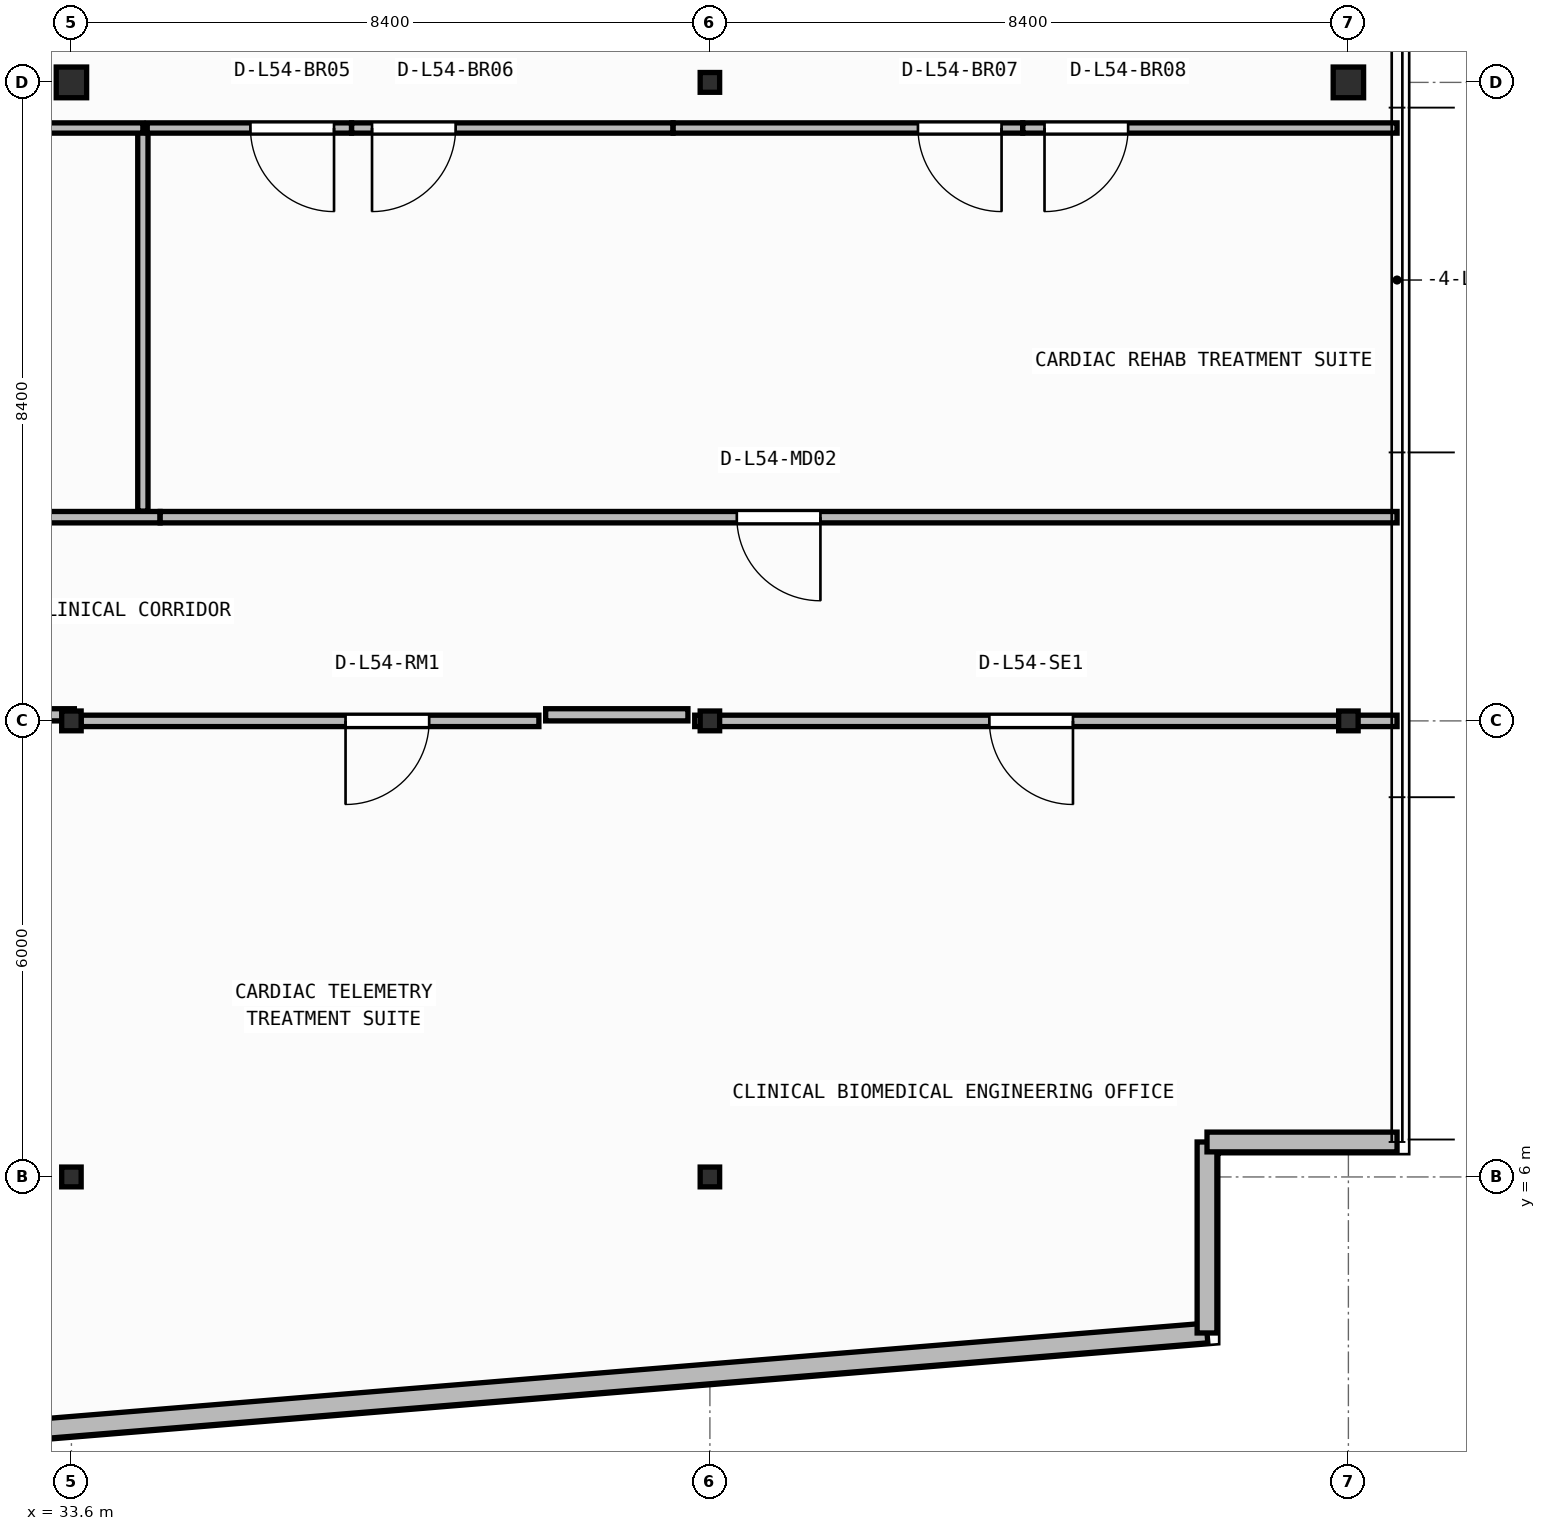
"""IFC4 building model, lengths in metres.
Left out: names, types, materials, properties, quantities, classifications, styles, units other than length and angle.
Written with IfcOpenShell. Run it as: python <this file> out.ifc"""

import sys

from ifc_helpers import new_model, si_unit, direction, frame, frame_2d, origin, origin_2d, place, context, subcontext, project, spatial, rectangle, i_section, extrude, element, fill, save


model = new_model("IFC4")
c1 = context("Model", 3, precision=1e-05, world=origin(), true_north=direction((0.0, 1.0)))
c2 = subcontext(c1, "Body", "Model", "MODEL_VIEW")
j1 = project(units=[si_unit("LENGTHUNIT", "METRE"), si_unit("PLANEANGLEUNIT", "RADIAN")], contexts=[c1])
p1 = place(None, origin())
s1 = spatial("IfcSite", under=j1, at=p1, CompositionType="ELEMENT")
p2 = place(p1, origin())
s2 = spatial("IfcBuilding", under=s1, at=p2, CompositionType="ELEMENT")
p3 = place(p2, frame((0.0, 0.0, 219.75)))
s3 = spatial("IfcBuildingStorey", under=s2, at=p3, CompositionType="ELEMENT", Elevation=219.75)
for number, where, z_axis, x_axis in (
    (1, (33.6, 6.0, 0.0), (0.0, 0.0, 1.0), (1.0, 0.0, 0.0)),
    (2, (42.0, 6.0, 0.0), (0.0, 0.0, 1.0), (1.0, 0.0, 0.0)),
    (3, (33.6, 12.0, 0.0), (0.0, 0.0, 1.0), (1.0, 0.0, 0.0)),
    (4, (42.0, 12.0, 0.0), (0.0, 0.0, 1.0), (1.0, 0.0, 0.0)),
    (5, (50.4, 12.0, 0.0), (0.0, 0.0, 1.0), (1.0, 0.0, 0.0)),
):
    element("IfcColumn", number, at=place(p3, frame(where, z_axis=z_axis, x_axis=x_axis)), inside=s3, PredefinedType="COLUMN", context=c2, shape_type="SweptSolid", body=[
        extrude(i_section(OverallWidth=0.256, OverallDepth=0.26, WebThickness=0.01, FlangeThickness=0.017, FilletRadius=0.013, at=origin_2d()), origin(), (0.0, 0.0, 1.0), 3.95),
    ])
p4 = place(p3, frame((33.6, 20.4, 0.0), z_axis=(0.0, 0.0, 1.0), x_axis=(1.0, 0.0, 0.0)))
e6 = element("IfcColumn", 6, at=p4, inside=s3, PredefinedType="COLUMN", context=c2, shape_type="SweptSolid", body=[
    extrude(i_section(OverallWidth=0.4, OverallDepth=0.404, WebThickness=0.02, FlangeThickness=0.032, at=origin_2d()), origin(), (0.0, 0.0, 1.0), 3.95),
])
p5 = place(p3, frame((42.0, 20.4, 0.0), z_axis=(0.0, 0.0, 1.0), x_axis=(1.0, 0.0, 0.0)))
e7 = element("IfcColumn", 7, at=p5, inside=s3, PredefinedType="COLUMN", context=c2, shape_type="SweptSolid", body=[
    extrude(i_section(OverallWidth=0.256, OverallDepth=0.26, WebThickness=0.01, FlangeThickness=0.017, FilletRadius=0.013, at=origin_2d()), origin(), (0.0, 0.0, 1.0), 3.95),
])
p6 = place(p3, frame((50.4, 20.4, 0.0), z_axis=(0.0, 0.0, 1.0), x_axis=(1.0, 0.0, 0.0)))
e8 = element("IfcColumn", 8, at=p6, inside=s3, PredefinedType="COLUMN", context=c2, shape_type="SweptSolid", body=[
    extrude(i_section(OverallWidth=0.4, OverallDepth=0.404, WebThickness=0.02, FlangeThickness=0.032, at=origin_2d()), origin(), (0.0, 0.0, 1.0), 3.95),
])
p7 = place(p3, frame((2.66, 0.174, 0.0), z_axis=(0.0, 0.0, 1.0), x_axis=(0.996634028439, 0.081979347142, 0.0)))
e9 = element("IfcWall", 9, at=p7, inside=s3, PredefinedType="STANDARD", context=c2, shape_type="SweptSolid", body=[
    extrude(rectangle(XDim=46.035, YDim=0.26, at=frame_2d((23.018, 0.0))), origin(), (0.0, 0.0, 1.0), 3.71),
])
p8 = place(p7, frame((21.817, 0.0, 0.9)))
e10 = element("IfcOpeningElement", 10, at=p8, cuts=e9, PredefinedType="OPENING", context=c2, shape_type="SweptSolid", body=[
    extrude(rectangle(XDim=2.4, YDim=1.65, at=frame_2d((1.2, 0.825))), frame((0.0, 0.14, 0.0), z_axis=(0.0, -1.0, 0.0), x_axis=(1.0, 0.0, 0.0)), (0.0, 0.0, 1.0), 0.28),
])
p9 = place(p3, frame((48.54, 3.948, 0.0), z_axis=(0.0, 0.0, 1.0), x_axis=(0.0, 1.0, 0.0)))
e11 = element("IfcWall", 11, at=p9, inside=s3, PredefinedType="STANDARD", context=c2, shape_type="SweptSolid", body=[
    extrude(rectangle(XDim=2.512, YDim=0.26, at=frame_2d((1.256, 0.0))), origin(), (0.0, 0.0, 1.0), 3.71),
])
p10 = place(p3, frame((48.54, 6.46, 0.0), z_axis=(0.0, 0.0, 1.0), x_axis=(1.0, 0.0, 0.0)))
e12 = element("IfcWall", 12, at=p10, inside=s3, PredefinedType="STANDARD", context=c2, shape_type="SweptSolid", body=[
    extrude(rectangle(XDim=2.5, YDim=0.26, at=frame_2d((1.25, 0.0))), origin(), (0.0, 0.0, 1.0), 3.71),
])
p11 = place(p3, frame((39.75, 12.0, 0.0), z_axis=(0.0, 0.0, 1.0), x_axis=(-1.0, 0.0, 0.0)))
e13 = element("IfcWall", 13, at=p11, inside=s3, PredefinedType="PARTITIONING", context=c2, shape_type="SweptSolid", body=[
    extrude(rectangle(XDim=6.022, YDim=0.15, at=frame_2d((3.011, 0.0))), origin(), (0.0, 0.0, 1.0), 3.152),
])
p12 = place(p11, frame((1.444, 0.0, 0.0)))
e14 = element("IfcOpeningElement", 14, at=p12, cuts=e13, PredefinedType="OPENING", context=c2, shape_type="SweptSolid", body=[
    extrude(rectangle(XDim=1.1, YDim=2.1, at=frame_2d((0.55, 1.05))), frame((0.0, 0.085, 0.0), z_axis=(0.0, -1.0, 0.0), x_axis=(1.0, 0.0, 0.0)), (0.0, 0.0, 1.0), 0.17),
])
p13 = place(p3, frame((51.04, 12.0, 0.0), z_axis=(0.0, 0.0, 1.0), x_axis=(-1.0, 0.0, 0.0)))
e15 = element("IfcWall", 15, at=p13, inside=s3, PredefinedType="PARTITIONING", context=c2, shape_type="SweptSolid", body=[
    extrude(rectangle(XDim=9.24, YDim=0.15, at=frame_2d((4.62, 0.0))), origin(), (0.0, 0.0, 1.0), 3.152),
])
p14 = place(p13, frame((4.263, 0.0, 0.0)))
e16 = element("IfcOpeningElement", 16, at=p14, cuts=e15, PredefinedType="OPENING", context=c2, shape_type="SweptSolid", body=[
    extrude(rectangle(XDim=1.1, YDim=2.1, at=frame_2d((0.55, 1.05))), frame((0.0, 0.085, 0.0), z_axis=(0.0, -1.0, 0.0), x_axis=(1.0, 0.0, 0.0)), (0.0, 0.0, 1.0), 0.17),
])
p15 = place(p3, frame((34.766, 14.68, 0.0), z_axis=(0.0, 0.0, 1.0), x_axis=(-1.0, 0.0, 0.0)))
e17 = element("IfcWall", 17, at=p15, inside=s3, PredefinedType="PARTITIONING", context=c2, shape_type="SweptSolid", body=[
    extrude(rectangle(XDim=21.212, YDim=0.15, at=frame_2d((10.606, 0.0))), origin(), (0.0, 0.0, 1.0), 3.71),
])
p16 = place(p15, frame((10.056, 0.0, 0.0)))
e18 = element("IfcOpeningElement", 18, at=p16, cuts=e17, PredefinedType="OPENING", context=c2, shape_type="SweptSolid", body=[
    extrude(rectangle(XDim=1.1, YDim=2.1, at=frame_2d((0.55, 1.05))), frame((0.0, 0.085, 0.0), z_axis=(0.0, -1.0, 0.0), x_axis=(1.0, 0.0, 0.0)), (0.0, 0.0, 1.0), 0.17),
])
p17 = place(p3, frame((51.04, 14.68, 0.0), z_axis=(0.0, 0.0, 1.0), x_axis=(-1.0, 0.0, 0.0)))
e19 = element("IfcWall", 19, at=p17, inside=s3, PredefinedType="PARTITIONING", context=c2, shape_type="SweptSolid", body=[
    extrude(rectangle(XDim=16.272, YDim=0.15, at=frame_2d((8.136, 0.0))), origin(), (0.0, 0.0, 1.0), 3.71),
])
p18 = place(p17, frame((7.586, 0.0, 0.0)))
e20 = element("IfcOpeningElement", 20, at=p18, cuts=e19, PredefinedType="OPENING", context=c2, shape_type="SweptSolid", body=[
    extrude(rectangle(XDim=1.1, YDim=2.1, at=frame_2d((0.55, 1.05))), frame((0.0, 0.085, 0.0), z_axis=(0.0, -1.0, 0.0), x_axis=(1.0, 0.0, 0.0)), (0.0, 0.0, 1.0), 0.17),
])
p19 = place(p3, frame((34.54, 14.76, 0.0), z_axis=(0.0, 0.0, 1.0), x_axis=(0.0, 1.0, 0.0)))
e21 = element("IfcWall", 21, at=p19, inside=s3, PredefinedType="PARTITIONING", context=c2, shape_type="SweptSolid", body=[
    extrude(rectangle(XDim=5.04, YDim=0.135, at=frame_2d((2.52, 0.0))), origin(), (0.0, 0.0, 1.0), 3.71),
])
p20 = place(p3, frame((34.54, 19.8, 0.0), z_axis=(0.0, 0.0, 1.0), x_axis=(-1.0, 0.0, 0.0)))
e22 = element("IfcWall", 22, at=p20, inside=s3, PredefinedType="PARTITIONING", context=c2, shape_type="SweptSolid", body=[
    extrude(rectangle(XDim=2.223, YDim=0.135, at=frame_2d((1.112, 0.0))), origin(), (0.0, 0.0, 1.0), 3.71),
])
p21 = place(p3, frame((37.285, 19.8, 0.0), z_axis=(0.0, 0.0, 1.0), x_axis=(-1.0, 0.0, 0.0)))
e23 = element("IfcWall", 23, at=p21, inside=s3, PredefinedType="PARTITIONING", context=c2, shape_type="SweptSolid", body=[
    extrude(rectangle(XDim=2.687, YDim=0.135, at=frame_2d((1.344, 0.0))), origin(), (0.0, 0.0, 1.0), 3.71),
])
p22 = place(p21, frame((0.23, 0.0, 0.0)))
e24 = element("IfcOpeningElement", 24, at=p22, cuts=e23, PredefinedType="OPENING", context=c2, shape_type="SweptSolid", body=[
    extrude(rectangle(XDim=1.1, YDim=2.1, at=frame_2d((0.55, 1.05))), frame((0.0, 0.077, 0.0), z_axis=(0.0, -1.0, 0.0), x_axis=(1.0, 0.0, 0.0)), (0.0, 0.0, 1.0), 0.155),
])
p23 = place(p3, frame((41.515, 19.8, 0.0), z_axis=(0.0, 0.0, 1.0), x_axis=(-1.0, 0.0, 0.0)))
e25 = element("IfcWall", 25, at=p23, inside=s3, PredefinedType="PARTITIONING", context=c2, shape_type="SweptSolid", body=[
    extrude(rectangle(XDim=4.228, YDim=0.135, at=frame_2d((2.114, 0.0))), origin(), (0.0, 0.0, 1.0), 3.71),
])
p24 = place(p23, frame((2.86, 0.0, 0.0)))
e26 = element("IfcOpeningElement", 26, at=p24, cuts=e25, PredefinedType="OPENING", context=c2, shape_type="SweptSolid", body=[
    extrude(rectangle(XDim=1.1, YDim=2.1, at=frame_2d((0.55, 1.05))), frame((0.0, 0.077, 0.0), z_axis=(0.0, -1.0, 0.0), x_axis=(1.0, 0.0, 0.0)), (0.0, 0.0, 1.0), 0.155),
])
p25 = place(p3, frame((46.115, 19.8, 0.0), z_axis=(0.0, 0.0, 1.0), x_axis=(-1.0, 0.0, 0.0)))
e27 = element("IfcWall", 27, at=p25, inside=s3, PredefinedType="PARTITIONING", context=c2, shape_type="SweptSolid", body=[
    extrude(rectangle(XDim=4.598, YDim=0.135, at=frame_2d((2.299, 0.0))), origin(), (0.0, 0.0, 1.0), 3.71),
])
p26 = place(p25, frame((0.278, 0.0, 0.0)))
e28 = element("IfcOpeningElement", 28, at=p26, cuts=e27, PredefinedType="OPENING", context=c2, shape_type="SweptSolid", body=[
    extrude(rectangle(XDim=1.1, YDim=2.1, at=frame_2d((0.55, 1.05))), frame((0.0, 0.077, 0.0), z_axis=(0.0, -1.0, 0.0), x_axis=(1.0, 0.0, 0.0)), (0.0, 0.0, 1.0), 0.155),
])
p27 = place(p3, frame((51.04, 19.8, 0.0), z_axis=(0.0, 0.0, 1.0), x_axis=(-1.0, 0.0, 0.0)))
e29 = element("IfcWall", 29, at=p27, inside=s3, PredefinedType="PARTITIONING", context=c2, shape_type="SweptSolid", body=[
    extrude(rectangle(XDim=4.923, YDim=0.135, at=frame_2d((2.462, 0.0))), origin(), (0.0, 0.0, 1.0), 3.71),
])
p28 = place(p27, frame((3.538, 0.0, 0.0)))
e30 = element("IfcOpeningElement", 30, at=p28, cuts=e29, PredefinedType="OPENING", context=c2, shape_type="SweptSolid", body=[
    extrude(rectangle(XDim=1.1, YDim=2.1, at=frame_2d((0.55, 1.05))), frame((0.0, 0.077, 0.0), z_axis=(0.0, -1.0, 0.0), x_axis=(1.0, 0.0, 0.0)), (0.0, 0.0, 1.0), 0.155),
])
p29 = place(p3, frame((31.439, 12.08, 0.0), z_axis=(0.0, 0.0, 1.0), x_axis=(1.0, 0.0, 0.0)))
e31 = element("IfcWall", 31, at=p29, inside=s3, PredefinedType="PARTITIONING", context=c2, shape_type="SweptSolid", body=[
    extrude(rectangle(XDim=2.199, YDim=0.16, at=frame_2d((1.1, 0.0))), origin(), (0.0, 0.0, 1.0), 3.152),
])
p30 = place(p3, frame((39.839, 12.08, 0.0), z_axis=(0.0, 0.0, 1.0), x_axis=(1.0, 0.0, 0.0)))
e32 = element("IfcWall", 32, at=p30, inside=s3, PredefinedType="PARTITIONING", context=c2, shape_type="SweptSolid", body=[
    extrude(rectangle(XDim=1.871, YDim=0.16, at=frame_2d((0.936, 0.0))), origin(), (0.0, 0.0, 1.0), 3.152),
])
p31 = place(p12, origin())
e33 = element("IfcDoor", 33, at=p31, inside=s3, OperationType="SINGLE_SWING_RIGHT", PredefinedType="DOOR", context=c2, shape_type="SweptSolid", body=[
    extrude(rectangle(XDim=1.1, YDim=2.1, at=frame_2d((0.55, 1.05))), frame((0.0, 0.025, 0.0), z_axis=(0.0, -1.0, 0.0), x_axis=(1.0, 0.0, 0.0)), (0.0, 0.0, 1.0), 0.05),
])
fill(e14, e33)
p32 = place(p14, origin())
e34 = element("IfcDoor", 34, at=p32, inside=s3, OperationType="SINGLE_SWING_LEFT", PredefinedType="DOOR", context=c2, shape_type="SweptSolid", body=[
    extrude(rectangle(XDim=1.1, YDim=2.1, at=frame_2d((0.55, 1.05))), frame((0.0, 0.025, 0.0), z_axis=(0.0, -1.0, 0.0), x_axis=(1.0, 0.0, 0.0)), (0.0, 0.0, 1.0), 0.05),
])
fill(e16, e34)
p33 = place(p18, origin())
e35 = element("IfcDoor", 35, at=p33, inside=s3, OperationType="SINGLE_SWING_LEFT", PredefinedType="DOOR", context=c2, shape_type="SweptSolid", body=[
    extrude(rectangle(XDim=1.1, YDim=2.1, at=frame_2d((0.55, 1.05))), frame((0.0, 0.025, 0.0), z_axis=(0.0, -1.0, 0.0), x_axis=(1.0, 0.0, 0.0)), (0.0, 0.0, 1.0), 0.05),
])
fill(e20, e35)
p34 = place(p22, origin())
e36 = element("IfcDoor", 36, at=p34, inside=s3, OperationType="SINGLE_SWING_LEFT", PredefinedType="DOOR", context=c2, shape_type="SweptSolid", body=[
    extrude(rectangle(XDim=1.1, YDim=2.1, at=frame_2d((0.55, 1.05))), frame((0.0, 0.025, 0.0), z_axis=(0.0, -1.0, 0.0), x_axis=(1.0, 0.0, 0.0)), (0.0, 0.0, 1.0), 0.05),
])
fill(e24, e36)
p35 = place(p24, origin())
e37 = element("IfcDoor", 37, at=p35, inside=s3, OperationType="SINGLE_SWING_RIGHT", PredefinedType="DOOR", context=c2, shape_type="SweptSolid", body=[
    extrude(rectangle(XDim=1.1, YDim=2.1, at=frame_2d((0.55, 1.05))), frame((0.0, 0.025, 0.0), z_axis=(0.0, -1.0, 0.0), x_axis=(1.0, 0.0, 0.0)), (0.0, 0.0, 1.0), 0.05),
])
fill(e26, e37)
p36 = place(p26, origin())
e38 = element("IfcDoor", 38, at=p36, inside=s3, OperationType="SINGLE_SWING_LEFT", PredefinedType="DOOR", context=c2, shape_type="SweptSolid", body=[
    extrude(rectangle(XDim=1.1, YDim=2.1, at=frame_2d((0.55, 1.05))), frame((0.0, 0.025, 0.0), z_axis=(0.0, -1.0, 0.0), x_axis=(1.0, 0.0, 0.0)), (0.0, 0.0, 1.0), 0.05),
])
fill(e28, e38)
p37 = place(p28, origin())
e39 = element("IfcDoor", 39, at=p37, inside=s3, OperationType="SINGLE_SWING_RIGHT", PredefinedType="DOOR", context=c2, shape_type="SweptSolid", body=[
    extrude(rectangle(XDim=1.1, YDim=2.1, at=frame_2d((0.55, 1.05))), frame((0.0, 0.025, 0.0), z_axis=(0.0, -1.0, 0.0), x_axis=(1.0, 0.0, 0.0)), (0.0, 0.0, 1.0), 0.05),
])
fill(e30, e39)
save(model, sys.argv[1])
